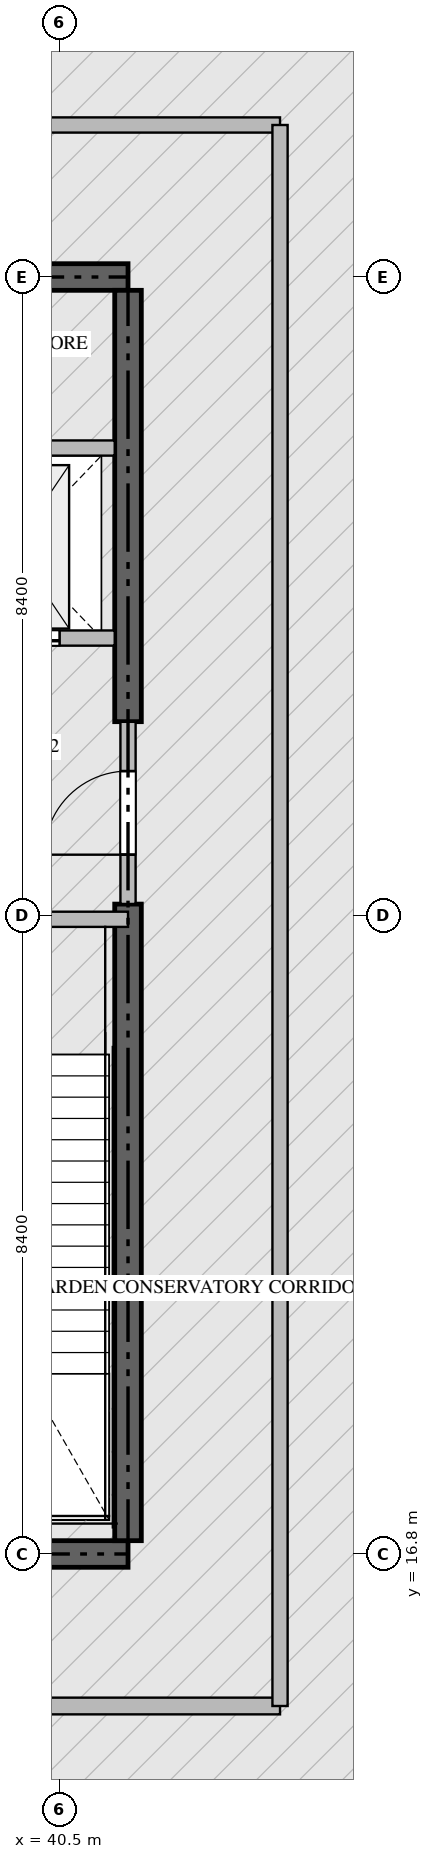
"""IFC4 building model, lengths in metres.
Left out: names, types, materials, properties, quantities, classifications, styles, units other than length and angle.
Written with IfcOpenShell. Run it as: python <this file> out.ifc"""

import sys

from ifc_helpers import new_model, si_unit, direction, frame, frame_2d, origin, place, context, subcontext, project, spatial, rectangle, extrude, source, transform, mapped, element, fill, save


model = new_model("IFC4")
c1 = context("Model", 3, precision=1e-05, world=origin(), true_north=direction((0.0, 1.0)))
c2 = subcontext(c1, "Body", "Model", "MODEL_VIEW")
j1 = project(units=[si_unit("LENGTHUNIT", "METRE"), si_unit("PLANEANGLEUNIT", "RADIAN")], contexts=[c1])
p1 = place(None, origin())
s1 = spatial("IfcSite", under=j1, at=p1, CompositionType="ELEMENT")
p2 = place(p1, origin())
s2 = spatial("IfcBuilding", under=s1, at=p2, CompositionType="ELEMENT")
p3 = place(p2, frame((0.0, 0.0, 359.75)))
s3 = spatial("IfcBuildingStorey", under=s2, at=p3, CompositionType="ELEMENT", Elevation=359.75)
for number, where, z_axis, x_axis in (
    (1, (23.4, 16.8, -0.36), (0.0, 0.0, 1.0), (1.0, 0.0, 0.0)),
    (2, (41.4, 33.6, -0.36), (0.0, 0.0, 1.0), (-1.0, 0.0, 0.0)),
):
    element("IfcWall", number, at=place(p3, frame(where, z_axis=z_axis, x_axis=x_axis)), inside=s3, PredefinedType="SHEAR", context=c2, shape_type="SweptSolid", body=[
        extrude(rectangle(XDim=18.0, YDim=0.35, at=frame_2d((9.0, 0.0))), origin(), (0.0, 0.0, 1.0), 5.998),
    ])
p4 = place(p3, frame((41.4, 16.975, -0.36), z_axis=(0.0, 0.0, 1.0), x_axis=(0.0, 1.0, 0.0)))
e3 = element("IfcWall", 3, at=p4, inside=s3, PredefinedType="SHEAR", context=c2, shape_type="SweptSolid", body=[
    extrude(rectangle(XDim=8.375, YDim=0.35, at=frame_2d((4.188, 0.0))), origin(), (0.0, 0.0, 1.0), 5.998),
])
p5 = place(p3, frame((41.4, 27.75, -0.36), z_axis=(0.0, 0.0, 1.0), x_axis=(0.0, 1.0, 0.0)))
e4 = element("IfcWall", 4, at=p5, inside=s3, PredefinedType="SHEAR", context=c2, shape_type="SweptSolid", body=[
    extrude(rectangle(XDim=5.675, YDim=0.35, at=frame_2d((2.837, 0.0))), origin(), (0.0, 0.0, 1.0), 5.998),
])
p6 = place(p3, frame((21.4, 14.8, 0.0), z_axis=(0.0, 0.0, 1.0), x_axis=(1.0, 0.0, 0.0)))
e5 = element("IfcWall", 5, at=p6, inside=s3, PredefinedType="ELEMENTEDWALL", context=c2, shape_type="SweptSolid", body=[
    extrude(rectangle(XDim=22.0, YDim=0.22, at=frame_2d((11.0, 0.0))), origin(), (0.0, 0.0, 1.0), 5.625),
])
p7 = place(p6, frame((10.2, 0.0, 0.0)))
e6 = element("IfcOpeningElement", 6, at=p7, cuts=e5, PredefinedType="OPENING", context=c2, shape_type="SweptSolid", body=[
    extrude(rectangle(XDim=1.6, YDim=2.3, at=frame_2d((0.8, 1.15))), frame((0.0, 0.12, 0.0), z_axis=(0.0, -1.0, 0.0), x_axis=(1.0, 0.0, 0.0)), (0.0, 0.0, 1.0), 0.24),
])
p8 = place(p3, frame((36.95, 25.15, 0.0), z_axis=(0.0, 0.0, 1.0), x_axis=(1.0, 0.0, 0.0)))
e7 = element("IfcWall", 7, at=p8, inside=s3, PredefinedType="STANDARD", context=c2, shape_type="SweptSolid", body=[
    extrude(rectangle(XDim=4.45, YDim=0.2, at=frame_2d((2.225, 0.0))), origin(), (0.0, 0.0, 1.0), 5.64),
])
p9 = place(p8, frame((1.65, 0.0, 0.0)))
e8 = element("IfcOpeningElement", 8, at=p9, cuts=e7, PredefinedType="OPENING", context=c2, shape_type="SweptSolid", body=[
    extrude(rectangle(XDim=1.1, YDim=2.15, at=frame_2d((0.55, 1.075))), frame((0.0, 0.11, 0.0), z_axis=(0.0, -1.0, 0.0), x_axis=(1.0, 0.0, 0.0)), (0.0, 0.0, 1.0), 0.22),
])
p10 = place(p3, frame((38.75, 28.85, 0.0), z_axis=(0.0, 0.0, 1.0), x_axis=(1.0, 0.0, 0.0)))
e9 = element("IfcWall", 9, at=p10, inside=s3, PredefinedType="STANDARD", context=c2, shape_type="SweptSolid", body=[
    extrude(rectangle(XDim=2.475, YDim=0.2, at=frame_2d((1.238, 0.0))), origin(), (0.0, 0.0, 1.0), 5.64),
])
p11 = place(p10, frame((0.55, 0.0, 0.0)))
e10 = element("IfcOpeningElement", 10, at=p11, cuts=e9, PredefinedType="OPENING", context=c2, shape_type="SweptSolid", body=[
    extrude(rectangle(XDim=1.2, YDim=2.2, at=frame_2d((0.6, 1.1))), frame((0.0, 0.11, 0.0), z_axis=(0.0, -1.0, 0.0), x_axis=(1.0, 0.0, 0.0)), (0.0, 0.0, 1.0), 0.22),
])
p12 = place(p3, frame((38.75, 31.35, 0.0), z_axis=(0.0, 0.0, 1.0), x_axis=(1.0, 0.0, 0.0)))
e11 = element("IfcWall", 11, at=p12, inside=s3, PredefinedType="STANDARD", context=c2, shape_type="SweptSolid", body=[
    extrude(rectangle(XDim=2.475, YDim=0.2, at=frame_2d((1.238, 0.0))), origin(), (0.0, 0.0, 1.0), 5.64),
])
p13 = place(p3, frame((41.4, 25.352, 0.0), z_axis=(0.0, 0.0, 1.0), x_axis=(0.0, 1.0, 0.0)))
e12 = element("IfcWall", 12, at=p13, inside=s3, PredefinedType="STANDARD", context=c2, shape_type="SweptSolid", body=[
    extrude(rectangle(XDim=2.396, YDim=0.2, at=frame_2d((1.198, 0.0))), origin(), (0.0, 0.0, 1.0), 5.64),
])
p14 = place(p13, frame((0.648, 0.0, 0.0)))
e13 = element("IfcOpeningElement", 13, at=p14, cuts=e12, PredefinedType="OPENING", context=c2, shape_type="SweptSolid", body=[
    extrude(rectangle(XDim=1.1, YDim=2.15, at=frame_2d((0.55, 1.075))), frame((0.0, 0.11, 0.0), z_axis=(0.0, -1.0, 0.0), x_axis=(1.0, 0.0, 0.0)), (0.0, 0.0, 1.0), 0.22),
])
p15 = place(p3, frame((21.4, 35.6, 0.0), z_axis=(0.0, 0.0, 1.0), x_axis=(1.0, 0.0, 0.0)))
e14 = element("IfcWall", 14, at=p15, inside=s3, PredefinedType="STANDARD", context=c2, shape_type="SweptSolid", body=[
    extrude(rectangle(XDim=22.0, YDim=0.2, at=frame_2d((11.0, 0.0))), origin(), (0.0, 0.0, 1.0), 5.64),
])
p16 = place(p15, frame((10.25, 0.0, 0.0)))
e15 = element("IfcOpeningElement", 15, at=p16, cuts=e14, PredefinedType="OPENING", context=c2, shape_type="SweptSolid", body=[
    extrude(rectangle(XDim=1.5, YDim=2.25, at=frame_2d((0.75, 1.125))), frame((0.0, 0.11, 0.0), z_axis=(0.0, -1.0, 0.0), x_axis=(1.0, 0.0, 0.0)), (0.0, 0.0, 1.0), 0.22),
])
p17 = place(p3, frame((43.4, 14.8, 0.0), z_axis=(0.0, 0.0, 1.0), x_axis=(0.0, 1.0, 0.0)))
e16 = element("IfcWall", 16, at=p17, inside=s3, PredefinedType="STANDARD", context=c2, shape_type="SweptSolid", body=[
    extrude(rectangle(XDim=20.8, YDim=0.2, at=frame_2d((10.4, 0.0))), origin(), (0.0, 0.0, 1.0), 5.64),
])
m1 = source(origin(), c2, "Body", "SweptSolid", [
    extrude(rectangle(XDim=1.2, YDim=2.2, at=frame_2d((0.6, 1.1))), frame((0.0, 0.025, 0.0), z_axis=(0.0, -1.0, 0.0), x_axis=(1.0, 0.0, 0.0)), (0.0, 0.0, 1.0), 0.05),
])
p18 = place(p11, origin())
e17 = element("IfcDoor", 17, at=p18, inside=s3, OperationType="DOUBLE_DOOR_SLIDING", PredefinedType="DOOR", context=c2, shape_type="MappedRepresentation", body=[
    mapped(m1, transform((0.0, 0.0, 0.0), scale=1.0)),
])
fill(e10, e17)
m2 = source(origin(), c2, "Body", "SweptSolid", [
    extrude(rectangle(XDim=1.1, YDim=2.15, at=frame_2d((0.55, 1.075))), frame((0.0, 0.025, 0.0), z_axis=(0.0, -1.0, 0.0), x_axis=(1.0, 0.0, 0.0)), (0.0, 0.0, 1.0), 0.05),
])
p19 = place(p14, origin())
e18 = element("IfcDoor", 18, at=p19, inside=s3, OperationType="SINGLE_SWING_LEFT", PredefinedType="DOOR", context=c2, shape_type="MappedRepresentation", body=[
    mapped(m2, transform((0.0, 0.0, 0.0), scale=1.0)),
])
fill(e13, e18)
save(model, sys.argv[1])
